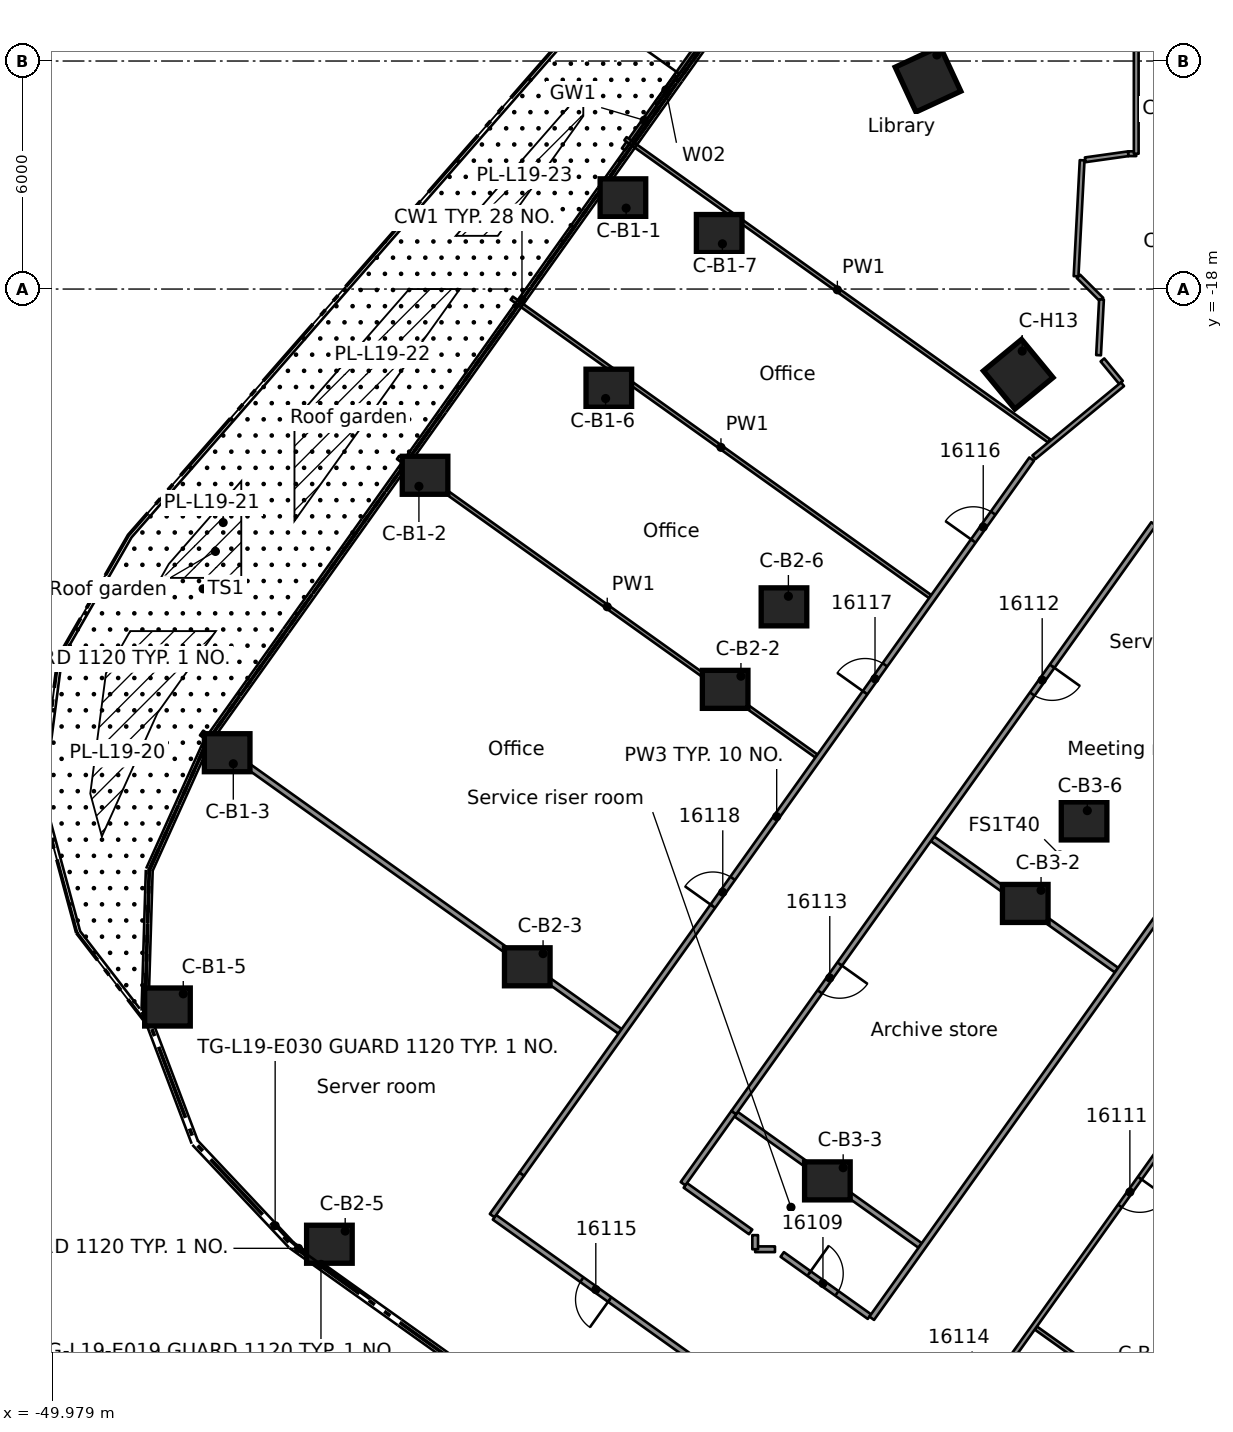
"""IFC4 building model, lengths in metres.
Left out: names, types, materials, properties, quantities, classifications, styles, units other than length and angle.
Written with IfcOpenShell. Run it as: python <this file> out.ifc"""

import sys

from ifc_helpers import new_model, si_unit, direction, frame, frame_2d, origin, origin_2d, place, context, subcontext, project, spatial, rectangle, extrude, element, fill, save


model = new_model("IFC4")
c1 = context("Model", 3, precision=1e-05, world=origin(), true_north=direction((0.0, 1.0)))
c2 = subcontext(c1, "Body", "Model", "MODEL_VIEW")
j1 = project(units=[si_unit("LENGTHUNIT", "METRE"), si_unit("PLANEANGLEUNIT", "RADIAN")], contexts=[c1])
p1 = place(None, origin())
s1 = spatial("IfcSite", under=j1, at=p1, CompositionType="ELEMENT")
p2 = place(p1, origin())
s2 = spatial("IfcBuilding", under=s1, at=p2, CompositionType="ELEMENT")
p3 = place(p2, frame((0.0, 0.0, 80.7)))
s3 = spatial("IfcBuildingStorey", under=s2, at=p3, CompositionType="ELEMENT", Elevation=80.7)
for number, where, z_axis, x_axis in (
    (1, (-34.957, -15.6, 0.0), (0.0, 0.0, 1.0), (1.0, 0.0, 0.0)),
    (2, (-40.164, -22.9, 0.0), (0.0, 0.0, 1.0), (1.0, 0.0, 0.0)),
    (3, (-45.371, -30.2, 0.0), (0.0, 0.0, 1.0), (1.0, 0.0, 0.0)),
    (4, (-46.942, -36.891, 0.0), (0.0, 0.0, 1.0), (1.0, 0.0, 0.0)),
    (5, (-35.328, -20.609, 0.0), (0.0, 0.0, 1.0), (1.0, 0.0, 0.0)),
    (6, (-32.424, -16.539, 0.0), (0.0, 0.0, 1.0), (1.0, 0.0, 0.0)),
    (7, (-32.267, -28.533, 0.0), (0.0, 0.0, 1.0), (1.0, 0.0, 0.0)),
    (8, (-37.474, -35.833, 0.0), (0.0, 0.0, 1.0), (1.0, 0.0, 0.0)),
    (9, (-42.681, -43.133, 0.0), (0.0, 0.0, 1.0), (1.0, 0.0, 0.0)),
    (10, (-30.719, -26.362, 0.0), (0.0, 0.0, 1.0), (1.0, 0.0, 0.0)),
    (11, (-24.37, -34.166, 0.0), (0.0, 0.0, 1.0), (1.0, 0.0, 0.0)),
    (12, (-29.577, -41.466, 0.0), (0.0, 0.0, 1.0), (1.0, 0.0, 0.0)),
    (13, (-22.822, -31.995, 0.0), (0.0, 0.0, 1.0), (1.0, 0.0, 0.0)),
):
    element("IfcColumn", number, at=place(p3, frame(where, z_axis=z_axis, x_axis=x_axis)), inside=s3, PredefinedType="COLUMN", context=c2, shape_type="SweptSolid", body=[
        extrude(rectangle(XDim=1.2, YDim=1.0, at=origin_2d()), origin(), (0.0, 0.0, 1.0), 3.5),
    ])
for number, where, z_axis, x_axis in (
    (14, (-24.555, -20.241, 0.0), (0.0, 0.0, 1.0), (-0.772, -0.636, 0.0)),
    (15, (-26.929, -12.478, 0.0), (0.0, 0.0, 1.0), (-0.907, -0.42, 0.0)),
):
    element("IfcColumn", number, at=place(p3, frame(where, z_axis=z_axis, x_axis=x_axis)), inside=s3, PredefinedType="COLUMN", context=c2, shape_type="SweptSolid", body=[
        extrude(rectangle(XDim=1.3, YDim=1.3, at=origin_2d()), origin(), (0.0, 0.0, 1.0), 3.5),
    ])
p4 = place(p3, frame((-34.943, -14.324, 0.0), z_axis=(0.0, 0.0, 1.0), x_axis=(0.580693274378, 0.814122423897, 0.0)))
e16 = element("IfcWall", 16, at=p4, inside=s3, PredefinedType="STANDARD", context=c2, shape_type="SweptSolid", body=[
    extrude(rectangle(XDim=4.706, YDim=0.1, at=frame_2d((2.353, 0.0))), origin(), (0.0, 0.0, 1.0), 3.1),
])
p5 = place(p4, frame((2.472, 0.0, 0.0)))
e17 = element("IfcOpeningElement", 17, at=p5, cuts=e16, PredefinedType="OPENING", context=c2, shape_type="SweptSolid", body=[
    extrude(rectangle(XDim=1.8, YDim=2.4, at=frame_2d((0.9, 1.2))), frame((0.0, 0.06, 0.0), z_axis=(0.0, -1.0, 0.0), x_axis=(1.0, 0.0, 0.0)), (0.0, 0.0, 1.0), 0.12),
])
p6 = place(p4, frame((1.472, 0.0, 0.0)))
e18 = element("IfcOpeningElement", 18, at=p6, cuts=e16, PredefinedType="OPENING", context=c2, shape_type="SweptSolid", body=[
    extrude(rectangle(XDim=0.9, YDim=2.4, at=frame_2d((0.45, 1.2))), frame((0.0, 0.06, 0.0), z_axis=(0.0, -1.0, 0.0), x_axis=(1.0, 0.0, 0.0)), (0.0, 0.0, 1.0), 0.12),
])
p7 = place(p3, frame((-22.339, -19.865, 0.0), z_axis=(0.0, 0.0, 1.0), x_axis=(0.636075239072, -0.771627040895, 0.0)))
e19 = element("IfcWall", 19, at=p7, inside=s3, PredefinedType="PARTITIONING", context=c2, shape_type="SweptSolid", body=[
    extrude(rectangle(XDim=0.767, YDim=0.125, at=frame_2d((0.384, 0.0))), origin(), (0.0, 0.0, 1.0), 3.08),
])
p8 = place(p3, frame((-27.621, -50.068, 0.0), z_axis=(0.0, 0.0, 1.0), x_axis=(-0.814096747286, 0.580729270881, 0.0)))
e20 = element("IfcWall", 20, at=p8, inside=s3, PredefinedType="PARTITIONING", context=c2, shape_type="SweptSolid", body=[
    extrude(rectangle(XDim=13.163, YDim=0.15, at=frame_2d((6.582, 0.0))), origin(), (0.0, 0.0, 1.0), 3.08),
])
p9 = place(p8, frame((9.438, 0.0, 0.0)))
e21 = element("IfcOpeningElement", 21, at=p9, cuts=e20, PredefinedType="OPENING", context=c2, shape_type="SweptSolid", body=[
    extrude(rectangle(XDim=0.9, YDim=2.1, at=frame_2d((0.45, 1.05))), frame((0.0, 0.085, 0.0), z_axis=(0.0, -1.0, 0.0), x_axis=(1.0, 0.0, 0.0)), (0.0, 0.0, 1.0), 0.17),
])
p10 = place(p3, frame((-33.315, -41.584, 0.0), z_axis=(0.0, 0.0, 1.0), x_axis=(0.814350377658, -0.580373554195, 0.0)))
e22 = element("IfcWall", 22, at=p10, inside=s3, PredefinedType="PARTITIONING", context=c2, shape_type="SweptSolid", body=[
    extrude(rectangle(XDim=2.111, YDim=0.15, at=frame_2d((1.055, 0.0))), origin(), (0.0, 0.0, 1.0), 3.08),
])
p11 = place(p3, frame((-30.765, -43.402, 0.0), z_axis=(0.0, 0.0, 1.0), x_axis=(0.814324494631, -0.580409870216, 0.0)))
e23 = element("IfcWall", 23, at=p11, inside=s3, PredefinedType="PARTITIONING", context=c2, shape_type="SweptSolid", body=[
    extrude(rectangle(XDim=2.817, YDim=0.15, at=frame_2d((1.408, 0.0))), origin(), (0.0, 0.0, 1.0), 3.08),
])
p12 = place(p11, frame((0.865, 0.0, 0.0)))
e24 = element("IfcOpeningElement", 24, at=p12, cuts=e23, PredefinedType="OPENING", context=c2, shape_type="SweptSolid", body=[
    extrude(rectangle(XDim=0.9, YDim=2.1, at=frame_2d((0.45, 1.05))), frame((0.0, 0.085, 0.0), z_axis=(0.0, -1.0, 0.0), x_axis=(1.0, 0.0, 0.0)), (0.0, 0.0, 1.0), 0.17),
])
p13 = place(p3, frame((-46.044, -29.68, 0.0), z_axis=(0.0, 0.0, 1.0), x_axis=(0.814185756817, -0.580604472423, 0.0)))
e25 = element("IfcWall", 25, at=p13, inside=s3, PredefinedType="PARTITIONING", context=c2, shape_type="SweptSolid", body=[
    extrude(rectangle(XDim=13.524, YDim=0.15, at=frame_2d((6.762, 0.0))), origin(), (0.0, 0.0, 1.0), 3.08),
])
p14 = place(p3, frame((-31.979, -39.712, 0.0), z_axis=(0.0, 0.0, 1.0), x_axis=(0.814224065699, -0.580550747857, 0.0)))
e26 = element("IfcWall", 26, at=p14, inside=s3, PredefinedType="PARTITIONING", context=c2, shape_type="SweptSolid", body=[
    extrude(rectangle(XDim=5.948, YDim=0.15, at=frame_2d((2.974, 0.0))), origin(), (0.0, 0.0, 1.0), 3.08),
])
p15 = place(p3, frame((-24.092, -45.337, 0.0), z_axis=(0.0, 0.0, 1.0), x_axis=(0.81412935301, -0.580683559753, 0.0)))
e27 = element("IfcWall", 27, at=p15, inside=s3, PredefinedType="PARTITIONING", context=c2, shape_type="SweptSolid", body=[
    extrude(rectangle(XDim=13.536, YDim=0.1, at=frame_2d((6.768, 0.0))), origin(), (0.0, 0.0, 1.0), 3.08),
])
p16 = place(p3, frame((-40.875, -22.433, 0.0), z_axis=(0.0, 0.0, 1.0), x_axis=(0.814093136476, -0.58073433267, 0.0)))
e28 = element("IfcWall", 28, at=p16, inside=s3, PredefinedType="PARTITIONING", context=c2, shape_type="SweptSolid", body=[
    extrude(rectangle(XDim=13.524, YDim=0.1, at=frame_2d((6.762, 0.0))), origin(), (0.0, 0.0, 1.0), 3.08),
])
p17 = place(p3, frame((-26.811, -32.466, 0.0), z_axis=(0.0, 0.0, 1.0), x_axis=(0.814165859022, -0.580632374229, 0.0)))
e29 = element("IfcWall", 29, at=p17, inside=s3, PredefinedType="PARTITIONING", context=c2, shape_type="SweptSolid", body=[
    extrude(rectangle(XDim=5.948, YDim=0.15, at=frame_2d((2.974, 0.0))), origin(), (0.0, 0.0, 1.0), 3.08),
])
p18 = place(p3, frame((-37.883, -18.239, 0.0), z_axis=(0.0, 0.0, 1.0), x_axis=(0.814185756817, -0.580604472423, 0.0)))
e30 = element("IfcWall", 30, at=p18, inside=s3, PredefinedType="PARTITIONING", context=c2, shape_type="SweptSolid", body=[
    extrude(rectangle(XDim=13.524, YDim=0.1, at=frame_2d((6.762, 0.0))), origin(), (0.0, 0.0, 1.0), 3.08),
])
p19 = place(p3, frame((-34.89, -14.043, 0.0), z_axis=(0.0, 0.0, 1.0), x_axis=(0.814106649966, -0.580715388534, 0.0)))
e31 = element("IfcWall", 31, at=p19, inside=s3, PredefinedType="PARTITIONING", context=c2, shape_type="SweptSolid", body=[
    extrude(rectangle(XDim=13.697, YDim=0.1, at=frame_2d((6.849, 0.0))), origin(), (0.0, 0.0, 1.0), 3.08),
])
p20 = place(p3, frame((-22.971, -17.666, 0.0), z_axis=(0.0, 0.0, 1.0), x_axis=(0.706538139097, -0.707674966352, 0.0)))
e32 = element("IfcWall", 32, at=p20, inside=s3, PredefinedType="PARTITIONING", context=c2, shape_type="SweptSolid", body=[
    extrude(rectangle(XDim=0.859, YDim=0.125, at=frame_2d((0.43, 0.0))), origin(), (0.0, 0.0, 1.0), 3.08),
])
p21 = place(p3, frame((-31.477, -43.265, 0.0), z_axis=(0.0, 0.0, 1.0), x_axis=(1.0, 0.0, 0.0)))
e33 = element("IfcWall", 33, at=p21, inside=s3, PredefinedType="PARTITIONING", context=c2, shape_type="SweptSolid", body=[
    extrude(rectangle(XDim=0.521, YDim=0.15, at=frame_2d((0.26, 0.0))), origin(), (0.0, 0.0, 1.0), 3.08),
])
p22 = place(p3, frame((-21.662, -14.439, 0.0), z_axis=(0.0, 0.0, 1.0), x_axis=(1.0, 0.0, 0.0)))
e34 = element("IfcWall", 34, at=p22, inside=s3, PredefinedType="PARTITIONING", context=c2, shape_type="SweptSolid", body=[
    extrude(rectangle(XDim=0.212, YDim=0.125, at=frame_2d((0.106, 0.0))), origin(), (0.0, 0.0, 1.0), 3.08),
])
p23 = place(p3, frame((-22.792, -14.599, 0.0), z_axis=(0.0, 0.0, 1.0), x_axis=(0.990221510194, 0.139503981125, 0.0)))
e35 = element("IfcWall", 35, at=p23, inside=s3, PredefinedType="PARTITIONING", context=c2, shape_type="SweptSolid", body=[
    extrude(rectangle(XDim=1.141, YDim=0.125, at=frame_2d((0.571, 0.0))), origin(), (0.0, 0.0, 1.0), 3.08),
])
p24 = place(p3, frame((-24.142, -22.427, 0.0), z_axis=(0.0, 0.0, 1.0), x_axis=(0.771535887112, 0.636185802182, 0.0)))
e36 = element("IfcWall", 36, at=p24, inside=s3, PredefinedType="PARTITIONING", context=c2, shape_type="SweptSolid", body=[
    extrude(rectangle(XDim=3.021, YDim=0.125, at=frame_2d((1.511, 0.0))), origin(), (0.0, 0.0, 1.0), 3.08),
])
p25 = place(p3, frame((-12.787, -29.381, 0.0), z_axis=(0.0, 0.0, 1.0), x_axis=(-0.580712931826, -0.81410840237, 0.0)))
e37 = element("IfcWall", 37, at=p25, inside=s3, PredefinedType="PARTITIONING", context=c2, shape_type="SweptSolid", body=[
    extrude(rectangle(XDim=25.155, YDim=0.125, at=frame_2d((12.578, 0.0))), origin(), (0.0, 0.0, 1.0), 3.08),
])
p26 = place(p25, frame((4.948, 0.0, 0.0)))
e38 = element("IfcOpeningElement", 38, at=p26, cuts=e37, PredefinedType="OPENING", context=c2, shape_type="SweptSolid", body=[
    extrude(rectangle(XDim=0.9, YDim=2.1, at=frame_2d((0.45, 1.05))), frame((0.0, 0.073, 0.0), z_axis=(0.0, -1.0, 0.0), x_axis=(1.0, 0.0, 0.0)), (0.0, 0.0, 1.0), 0.145),
])
p27 = place(p25, frame((14.755, 0.0, 0.0)))
e39 = element("IfcOpeningElement", 39, at=p27, cuts=e37, PredefinedType="OPENING", context=c2, shape_type="SweptSolid", body=[
    extrude(rectangle(XDim=0.9, YDim=2.1, at=frame_2d((0.45, 1.05))), frame((0.0, 0.073, 0.0), z_axis=(0.0, -1.0, 0.0), x_axis=(1.0, 0.0, 0.0)), (0.0, 0.0, 1.0), 0.145),
])
p28 = place(p25, frame((21.906, 0.0, 0.0)))
e40 = element("IfcOpeningElement", 40, at=p28, cuts=e37, PredefinedType="OPENING", context=c2, shape_type="SweptSolid", body=[
    extrude(rectangle(XDim=0.9, YDim=2.1, at=frame_2d((0.45, 1.05))), frame((0.0, 0.073, 0.0), z_axis=(0.0, -1.0, 0.0), x_axis=(1.0, 0.0, 0.0)), (0.0, 0.0, 1.0), 0.145),
])
p29 = place(p3, frame((-28.41, -45.081, 0.0), z_axis=(0.0, 0.0, 1.0), x_axis=(0.580610007884, 0.814181809392, 0.0)))
e41 = element("IfcWall", 41, at=p29, inside=s3, PredefinedType="PARTITIONING", context=c2, shape_type="SweptSolid", body=[
    extrude(rectangle(XDim=21.035, YDim=0.15, at=frame_2d((10.517, 0.0))), origin(), (0.0, 0.0, 1.0), 3.08),
])
p30 = place(p3, frame((-33.376, -41.54, 0.0), z_axis=(0.0, 0.0, 1.0), x_axis=(0.580876637745, 0.813991604209, 0.0)))
e42 = element("IfcWall", 42, at=p30, inside=s3, PredefinedType="PARTITIONING", context=c2, shape_type="SweptSolid", body=[
    extrude(rectangle(XDim=2.3, YDim=0.15, at=frame_2d((1.15, 0.0))), origin(), (0.0, 0.0, 1.0), 3.08),
])
p31 = place(p3, frame((-20.992, -24.178, 0.0), z_axis=(0.0, 0.0, 1.0), x_axis=(-0.580674845043, -0.814135568768, 0.0)))
e43 = element("IfcWall", 43, at=p31, inside=s3, PredefinedType="PARTITIONING", context=c2, shape_type="SweptSolid", body=[
    extrude(rectangle(XDim=19.026, YDim=0.15, at=frame_2d((9.513, 0.0))), origin(), (0.0, 0.0, 1.0), 3.08),
])
p32 = place(p31, frame((4.6, 0.0, 0.0)))
e44 = element("IfcOpeningElement", 44, at=p32, cuts=e43, PredefinedType="OPENING", context=c2, shape_type="SweptSolid", body=[
    extrude(rectangle(XDim=0.9, YDim=2.1, at=frame_2d((0.45, 1.05))), frame((0.0, 0.085, 0.0), z_axis=(0.0, -1.0, 0.0), x_axis=(1.0, 0.0, 0.0)), (0.0, 0.0, 1.0), 0.17),
])
p33 = place(p31, frame((14.226, 0.0, 0.0)))
e45 = element("IfcOpeningElement", 45, at=p33, cuts=e43, PredefinedType="OPENING", context=c2, shape_type="SweptSolid", body=[
    extrude(rectangle(XDim=0.9, YDim=2.1, at=frame_2d((0.45, 1.05))), frame((0.0, 0.085, 0.0), z_axis=(0.0, -1.0, 0.0), x_axis=(1.0, 0.0, 0.0)), (0.0, 0.0, 1.0), 0.17),
])
p34 = place(p3, frame((-37.621, -41.29, 0.0), z_axis=(0.0, 0.0, 1.0), x_axis=(0.580691447967, 0.814123726628, 0.0)))
e46 = element("IfcWall", 46, at=p34, inside=s3, PredefinedType="PARTITIONING", context=c2, shape_type="SweptSolid", body=[
    extrude(rectangle(XDim=23.111, YDim=0.15, at=frame_2d((11.555, 0.0))), origin(), (0.0, 0.0, 1.0), 3.08),
])
p35 = place(p34, frame((20.465, 0.0, 0.0)))
e47 = element("IfcOpeningElement", 47, at=p35, cuts=e46, PredefinedType="OPENING", context=c2, shape_type="SweptSolid", body=[
    extrude(rectangle(XDim=0.9, YDim=2.1, at=frame_2d((0.45, 1.05))), frame((0.0, 0.085, 0.0), z_axis=(0.0, -1.0, 0.0), x_axis=(1.0, 0.0, 0.0)), (0.0, 0.0, 1.0), 0.17),
])
p36 = place(p34, frame((15.561, 0.0, 0.0)))
e48 = element("IfcOpeningElement", 48, at=p36, cuts=e46, PredefinedType="OPENING", context=c2, shape_type="SweptSolid", body=[
    extrude(rectangle(XDim=0.9, YDim=2.1, at=frame_2d((0.45, 1.05))), frame((0.0, 0.085, 0.0), z_axis=(0.0, -1.0, 0.0), x_axis=(1.0, 0.0, 0.0)), (0.0, 0.0, 1.0), 0.17),
])
p37 = place(p34, frame((8.662, 0.0, 0.0)))
e49 = element("IfcOpeningElement", 49, at=p37, cuts=e46, PredefinedType="OPENING", context=c2, shape_type="SweptSolid", body=[
    extrude(rectangle(XDim=0.9, YDim=2.1, at=frame_2d((0.45, 1.05))), frame((0.0, 0.085, 0.0), z_axis=(0.0, -1.0, 0.0), x_axis=(1.0, 0.0, 0.0)), (0.0, 0.0, 1.0), 0.17),
])
p38 = place(p3, frame((-38.398, -42.38, 0.0), z_axis=(0.0, 0.0, 1.0), x_axis=(0.580444165939, 0.814300049262, 0.0)))
e50 = element("IfcWall", 50, at=p38, inside=s3, PredefinedType="PARTITIONING", context=c2, shape_type="SweptSolid", body=[
    extrude(rectangle(XDim=1.338, YDim=0.15, at=frame_2d((0.669, 0.0))), origin(), (0.0, 0.0, 1.0), 3.08),
])
p39 = place(p3, frame((-22.441, -19.74, 0.0), z_axis=(0.0, 0.0, 1.0), x_axis=(0.052384264045, 0.998627001878, 0.0)))
e51 = element("IfcWall", 51, at=p39, inside=s3, PredefinedType="PARTITIONING", context=c2, shape_type="SweptSolid", body=[
    extrude(rectangle(XDim=1.468, YDim=0.125, at=frame_2d((0.734, 0.0))), origin(), (0.0, 0.0, 1.0), 3.08),
])
p40 = place(p3, frame((-23.033, -17.663, 0.0), z_axis=(0.0, 0.0, 1.0), x_axis=(0.052324034434, 0.998630159479, 0.0)))
e52 = element("IfcWall", 52, at=p40, inside=s3, PredefinedType="PARTITIONING", context=c2, shape_type="SweptSolid", body=[
    extrude(rectangle(XDim=3.056, YDim=0.125, at=frame_2d((1.528, 0.0))), origin(), (0.0, 0.0, 1.0), 3.08),
])
p41 = place(p3, frame((-21.45, -14.439, 0.0), z_axis=(0.0, 0.0, 1.0), x_axis=(0.0, 1.0, 0.0)))
e53 = element("IfcWall", 53, at=p41, inside=s3, PredefinedType="PARTITIONING", context=c2, shape_type="SweptSolid", body=[
    extrude(rectangle(XDim=28.89, YDim=0.125, at=frame_2d((14.445, 0.0))), origin(), (0.0, 0.0, 1.0), 3.08),
])
p42 = place(p41, frame((3.35, 0.0, 0.0)))
e54 = element("IfcOpeningElement", 54, at=p42, cuts=e53, PredefinedType="OPENING", context=c2, shape_type="SweptSolid", body=[
    extrude(rectangle(XDim=1.8, YDim=2.1, at=frame_2d((0.9, 1.05))), frame((0.0, 0.073, 0.0), z_axis=(0.0, -1.0, 0.0), x_axis=(1.0, 0.0, 0.0)), (0.0, 0.0, 1.0), 0.145),
])
p43 = place(p41, frame((17.544, 0.0, 0.0)))
e55 = element("IfcOpeningElement", 55, at=p43, cuts=e53, PredefinedType="OPENING", context=c2, shape_type="SweptSolid", body=[
    extrude(rectangle(XDim=1.1, YDim=2.1, at=frame_2d((0.55, 1.05))), frame((0.0, 0.073, 0.0), z_axis=(0.0, -1.0, 0.0), x_axis=(1.0, 0.0, 0.0)), (0.0, 0.0, 1.0), 0.145),
])
p44 = place(p41, frame((11.045, 0.0, 0.0)))
e56 = element("IfcOpeningElement", 56, at=p44, cuts=e53, PredefinedType="OPENING", context=c2, shape_type="SweptSolid", body=[
    extrude(rectangle(XDim=0.9, YDim=2.1, at=frame_2d((0.45, 1.05))), frame((0.0, 0.073, 0.0), z_axis=(0.0, -1.0, 0.0), x_axis=(1.0, 0.0, 0.0)), (0.0, 0.0, 1.0), 0.145),
])
p45 = place(p3, frame((-31.477, -43.265, 0.0), z_axis=(0.0, 0.0, 1.0), x_axis=(0.0, 1.0, 0.0)))
e57 = element("IfcWall", 57, at=p45, inside=s3, PredefinedType="PARTITIONING", context=c2, shape_type="SweptSolid", body=[
    extrude(rectangle(XDim=0.371, YDim=0.15, at=frame_2d((0.186, 0.0))), origin(), (0.0, 0.0, 1.0), 3.08),
])
p46 = place(p5, origin())
e58 = element("IfcDoor", 58, at=p46, inside=s3, OperationType="DOUBLE_DOOR_SINGLE_SWING", PredefinedType="DOOR", context=c2, shape_type="SweptSolid", body=[
    extrude(rectangle(XDim=1.8, YDim=2.4, at=frame_2d((0.9, 1.2))), frame((0.0, 0.025, 0.0), z_axis=(0.0, -1.0, 0.0), x_axis=(1.0, 0.0, 0.0)), (0.0, 0.0, 1.0), 0.05),
])
fill(e17, e58)
p47 = place(p6, origin())
e59 = element("IfcWindow", 59, at=p47, inside=s3, PartitioningType="SINGLE_PANEL", PredefinedType="WINDOW", context=c2, shape_type="SweptSolid", body=[
    extrude(rectangle(XDim=0.9, YDim=2.4, at=frame_2d((0.45, 1.2))), frame((0.0, 0.03, 0.0), z_axis=(0.0, -1.0, 0.0), x_axis=(1.0, 0.0, 0.0)), (0.0, 0.0, 1.0), 0.06),
])
fill(e18, e59)
p48 = place(p12, origin())
e60 = element("IfcDoor", 60, at=p48, inside=s3, OperationType="SINGLE_SWING_LEFT", PredefinedType="DOOR", context=c2, shape_type="SweptSolid", body=[
    extrude(rectangle(XDim=0.9, YDim=2.1, at=frame_2d((0.45, 1.05))), frame((0.0, 0.025, 0.0), z_axis=(0.0, -1.0, 0.0), x_axis=(1.0, 0.0, 0.0)), (0.0, 0.0, 1.0), 0.05),
])
fill(e24, e60)
p49 = place(p27, origin())
e61 = element("IfcDoor", 61, at=p49, inside=s3, OperationType="SINGLE_SWING_RIGHT", PredefinedType="DOOR", context=c2, shape_type="SweptSolid", body=[
    extrude(rectangle(XDim=0.9, YDim=2.1, at=frame_2d((0.45, 1.05))), frame((0.0, 0.025, 0.0), z_axis=(0.0, -1.0, 0.0), x_axis=(1.0, 0.0, 0.0)), (0.0, 0.0, 1.0), 0.05),
])
fill(e39, e61)
p50 = place(p32, origin())
e62 = element("IfcDoor", 62, at=p50, inside=s3, OperationType="SINGLE_SWING_LEFT", PredefinedType="DOOR", context=c2, shape_type="SweptSolid", body=[
    extrude(rectangle(XDim=0.9, YDim=2.1, at=frame_2d((0.45, 1.05))), frame((0.0, 0.025, 0.0), z_axis=(0.0, -1.0, 0.0), x_axis=(1.0, 0.0, 0.0)), (0.0, 0.0, 1.0), 0.05),
])
fill(e44, e62)
p51 = place(p33, origin())
e63 = element("IfcDoor", 63, at=p51, inside=s3, OperationType="SINGLE_SWING_RIGHT", PredefinedType="DOOR", context=c2, shape_type="SweptSolid", body=[
    extrude(rectangle(XDim=0.9, YDim=2.1, at=frame_2d((0.45, 1.05))), frame((0.0, 0.025, 0.0), z_axis=(0.0, -1.0, 0.0), x_axis=(1.0, 0.0, 0.0)), (0.0, 0.0, 1.0), 0.05),
])
fill(e45, e63)
p52 = place(p9, origin())
e64 = element("IfcDoor", 64, at=p52, inside=s3, OperationType="SINGLE_SWING_RIGHT", PredefinedType="DOOR", context=c2, shape_type="SweptSolid", body=[
    extrude(rectangle(XDim=0.9, YDim=2.1, at=frame_2d((0.45, 1.05))), frame((0.0, 0.025, 0.0), z_axis=(0.0, -1.0, 0.0), x_axis=(1.0, 0.0, 0.0)), (0.0, 0.0, 1.0), 0.05),
])
fill(e21, e64)
p53 = place(p35, origin())
e65 = element("IfcDoor", 65, at=p53, inside=s3, OperationType="SINGLE_SWING_RIGHT", PredefinedType="DOOR", context=c2, shape_type="SweptSolid", body=[
    extrude(rectangle(XDim=0.9, YDim=2.1, at=frame_2d((0.45, 1.05))), frame((0.0, 0.025, 0.0), z_axis=(0.0, -1.0, 0.0), x_axis=(1.0, 0.0, 0.0)), (0.0, 0.0, 1.0), 0.05),
])
fill(e47, e65)
p54 = place(p36, origin())
e66 = element("IfcDoor", 66, at=p54, inside=s3, OperationType="SINGLE_SWING_RIGHT", PredefinedType="DOOR", context=c2, shape_type="SweptSolid", body=[
    extrude(rectangle(XDim=0.9, YDim=2.1, at=frame_2d((0.45, 1.05))), frame((0.0, 0.025, 0.0), z_axis=(0.0, -1.0, 0.0), x_axis=(1.0, 0.0, 0.0)), (0.0, 0.0, 1.0), 0.05),
])
fill(e48, e66)
p55 = place(p37, origin())
e67 = element("IfcDoor", 67, at=p55, inside=s3, OperationType="SINGLE_SWING_LEFT", PredefinedType="DOOR", context=c2, shape_type="SweptSolid", body=[
    extrude(rectangle(XDim=0.9, YDim=2.1, at=frame_2d((0.45, 1.05))), frame((0.0, 0.025, 0.0), z_axis=(0.0, -1.0, 0.0), x_axis=(1.0, 0.0, 0.0)), (0.0, 0.0, 1.0), 0.05),
])
fill(e49, e67)
save(model, sys.argv[1])
